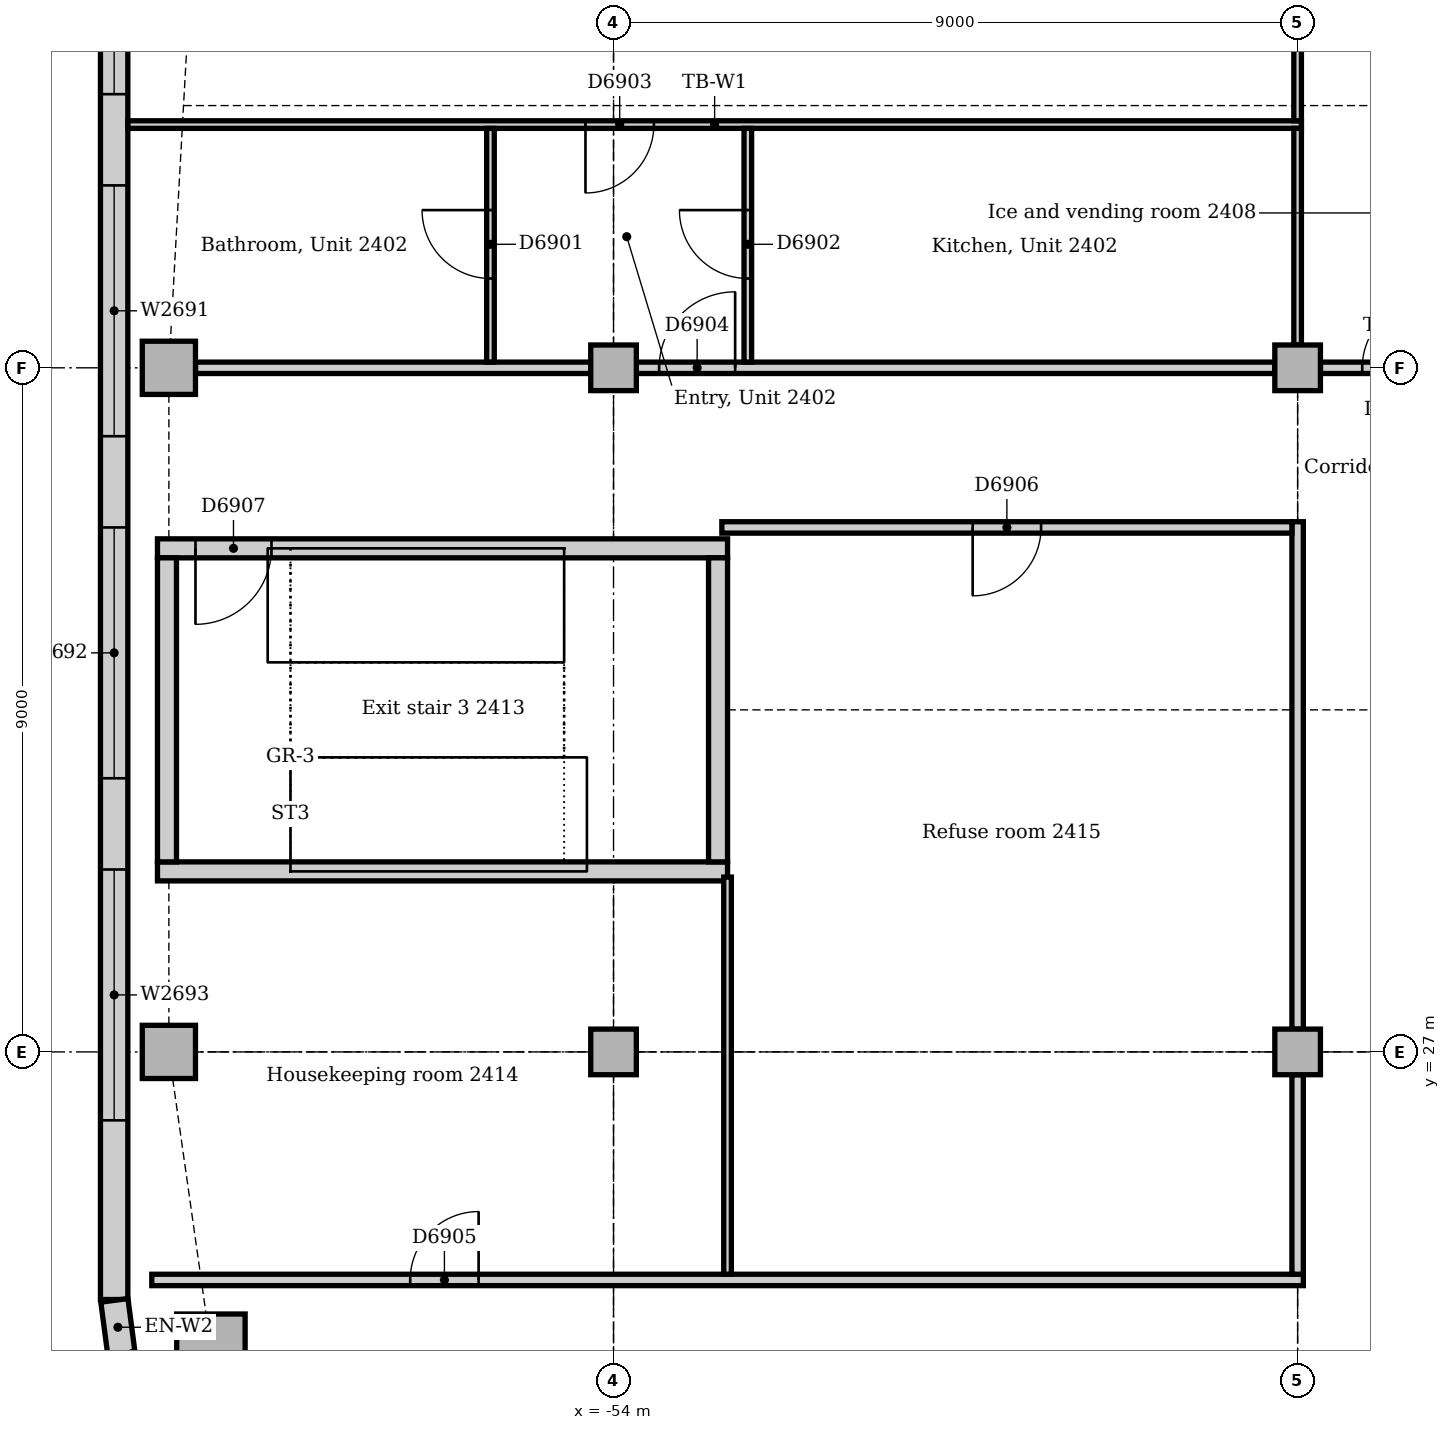
"""IFC4 building model, lengths in metres.
Left out: names, types, materials, properties, quantities, classifications, styles, units other than length and angle.
Written with IfcOpenShell. Run it as: python <this file> out.ifc"""

import sys

from ifc_helpers import new_model, si_unit, direction, frame, frame_2d, origin, origin_2d, place, context, subcontext, project, spatial, rectangle, extrude, element, fill, save


model = new_model("IFC4")
c1 = context("Model", 3, precision=1e-05, world=origin(), true_north=direction((0.0, 1.0)))
c2 = subcontext(c1, "Body", "Model", "MODEL_VIEW")
j1 = project(units=[si_unit("LENGTHUNIT", "METRE"), si_unit("PLANEANGLEUNIT", "RADIAN")], contexts=[c1])
p1 = place(None, origin())
s1 = spatial("IfcSite", under=j1, at=p1, CompositionType="ELEMENT")
p2 = place(p1, origin())
s2 = spatial("IfcBuilding", under=s1, at=p2, CompositionType="ELEMENT")
p3 = place(p2, frame((0.0, 0.0, 104.0)))
s3 = spatial("IfcBuildingStorey", under=s2, at=p3, CompositionType="ELEMENT", Elevation=104.0)
p4 = place(p3, frame((-60.0, 29.375, 0.0), z_axis=(0.0, 0.0, 1.0), x_axis=(1.0, 0.0, 0.0)))
e1 = element("IfcWall", 1, at=p4, inside=s3, PredefinedType="SOLIDWALL", context=c2, shape_type="SweptSolid", body=[
    extrude(rectangle(XDim=7.5, YDim=0.25, at=frame_2d((3.75, 0.0))), origin(), (0.0, 0.0, 1.0), 4.0),
])
p5 = place(p3, frame((-52.5, 33.625, 0.0), z_axis=(0.0, 0.0, 1.0), x_axis=(-1.0, 0.0, 0.0)))
e2 = element("IfcWall", 2, at=p5, inside=s3, PredefinedType="SOLIDWALL", context=c2, shape_type="SweptSolid", body=[
    extrude(rectangle(XDim=7.5, YDim=0.25, at=frame_2d((3.75, 0.0))), origin(), (0.0, 0.0, 1.0), 4.0),
])
p6 = place(p5, frame((6.0, 0.0, 0.0)))
e3 = element("IfcOpeningElement", 3, at=p6, cuts=e2, PredefinedType="OPENING", context=c2, shape_type="SweptSolid", body=[
    extrude(rectangle(XDim=1.0, YDim=2.1, at=frame_2d((0.5, 1.05))), frame((0.0, 0.135, 0.0), z_axis=(0.0, -1.0, 0.0), x_axis=(1.0, 0.0, 0.0)), (0.0, 0.0, 1.0), 0.27),
])
for number, where, z_axis, x_axis in (
    (4, (-52.625, 29.5, 0.0), (0.0, 0.0, 1.0), (0.0, 1.0, 0.0)),
    (5, (-59.875, 33.5, 0.0), (0.0, 0.0, 1.0), (0.0, -1.0, 0.0)),
):
    element("IfcWall", number, at=place(p3, frame(where, z_axis=z_axis, x_axis=x_axis)), inside=s3, PredefinedType="SOLIDWALL", context=c2, shape_type="SweptSolid", body=[
        extrude(rectangle(XDim=4.0, YDim=0.25, at=frame_2d((2.0, 0.0))), origin(), (0.0, 0.0, 1.0), 4.0),
    ])
p7 = place(p3, frame((-59.297, 23.102, 0.0), z_axis=(0.0, 0.0, 1.0), x_axis=(1.0, 0.0, 0.0)))
e6 = element("IfcColumn", 6, at=p7, inside=s3, PredefinedType="COLUMN", context=c2, shape_type="SweptSolid", body=[
    extrude(rectangle(XDim=0.9, YDim=0.9, at=origin_2d()), origin(), (0.0, 0.0, 1.0), 3.85),
])
for number, where, z_axis, x_axis in (
    (7, (-59.85, 27.0, 0.0), (0.0, 0.0, 1.0), (1.0, 0.0, 0.0)),
    (8, (-59.85, 36.0, 0.0), (0.0, 0.0, 1.0), (1.0, 0.0, 0.0)),
):
    element("IfcColumn", number, at=place(p3, frame(where, z_axis=z_axis, x_axis=x_axis)), inside=s3, PredefinedType="COLUMN", context=c2, shape_type="SweptSolid", body=[
        extrude(rectangle(XDim=0.7, YDim=0.7, at=origin_2d()), origin(), (0.0, 0.0, 1.0), 3.85),
    ])
for number, where, z_axis, x_axis in (
    (9, (-54.0, 27.0, 0.0), (0.0, 0.0, 1.0), (1.0, 0.0, 0.0)),
    (10, (-54.0, 36.0, 0.0), (0.0, 0.0, 1.0), (1.0, 0.0, 0.0)),
    (11, (-45.0, 27.0, 0.0), (0.0, 0.0, 1.0), (1.0, 0.0, 0.0)),
    (12, (-45.0, 36.0, 0.0), (0.0, 0.0, 1.0), (1.0, 0.0, 0.0)),
):
    element("IfcColumn", number, at=place(p3, frame(where, z_axis=z_axis, x_axis=x_axis)), inside=s3, PredefinedType="COLUMN", context=c2, shape_type="SweptSolid", body=[
        extrude(rectangle(XDim=0.6, YDim=0.6, at=origin_2d()), origin(), (0.0, 0.0, 1.0), 3.85),
    ])
p8 = place(p3, frame((-60.57, 45.257, 0.0), z_axis=(0.0, 0.0, 1.0), x_axis=(0.0, -1.0, 0.0)))
e13 = element("IfcWall", 13, at=p8, inside=s3, PredefinedType="STANDARD", context=c2, shape_type="SweptSolid", body=[
    extrude(rectangle(XDim=21.515, YDim=0.36, at=frame_2d((10.757, 0.0))), origin(), (0.0, 0.0, 1.0), 3.85),
])
p9 = place(p8, frame((2.357, 0.0, 0.9)))
e14 = element("IfcOpeningElement", 14, at=p9, cuts=e13, PredefinedType="OPENING", context=c2, shape_type="SweptSolid", body=[
    extrude(rectangle(XDim=3.3, YDim=1.6, at=frame_2d((1.65, 0.8))), frame((0.0, 0.19, 0.0), z_axis=(0.0, -1.0, 0.0), x_axis=(1.0, 0.0, 0.0)), (0.0, 0.0, 1.0), 0.38),
])
p10 = place(p8, frame((6.857, 0.0, 0.9)))
e15 = element("IfcOpeningElement", 15, at=p10, cuts=e13, PredefinedType="OPENING", context=c2, shape_type="SweptSolid", body=[
    extrude(rectangle(XDim=3.3, YDim=1.6, at=frame_2d((1.65, 0.8))), frame((0.0, 0.19, 0.0), z_axis=(0.0, -1.0, 0.0), x_axis=(1.0, 0.0, 0.0)), (0.0, 0.0, 1.0), 0.38),
])
p11 = place(p8, frame((11.357, 0.0, 0.9)))
e16 = element("IfcOpeningElement", 16, at=p11, cuts=e13, PredefinedType="OPENING", context=c2, shape_type="SweptSolid", body=[
    extrude(rectangle(XDim=3.3, YDim=1.6, at=frame_2d((1.65, 0.8))), frame((0.0, 0.19, 0.0), z_axis=(0.0, -1.0, 0.0), x_axis=(1.0, 0.0, 0.0)), (0.0, 0.0, 1.0), 0.38),
])
p12 = place(p8, frame((15.857, 0.0, 0.9)))
e17 = element("IfcOpeningElement", 17, at=p12, cuts=e13, PredefinedType="OPENING", context=c2, shape_type="SweptSolid", body=[
    extrude(rectangle(XDim=3.3, YDim=1.6, at=frame_2d((1.65, 0.8))), frame((0.0, 0.19, 0.0), z_axis=(0.0, -1.0, 0.0), x_axis=(1.0, 0.0, 0.0)), (0.0, 0.0, 1.0), 0.38),
])
p13 = place(p3, frame((-60.567, 23.731, 0.0), z_axis=(0.0, 0.0, 1.0), x_axis=(0.13055608231, -0.99144092581, 0.0)))
e18 = element("IfcWall", 18, at=p13, inside=s3, PredefinedType="STANDARD", context=c2, shape_type="SweptSolid", body=[
    extrude(rectangle(XDim=0.713, YDim=0.36, at=frame_2d((0.356, 0.0))), origin(), (0.0, 0.0, 1.0), 3.85),
])
p14 = place(p3, frame((-44.7, 36.0, 0.0), z_axis=(0.0, 0.0, 1.0), x_axis=(1.0, 0.0, 0.0)))
e19 = element("IfcWall", 19, at=p14, inside=s3, PredefinedType="PARTITIONING", context=c2, shape_type="SweptSolid", body=[
    extrude(rectangle(XDim=1.975, YDim=0.15, at=frame_2d((0.988, 0.0))), origin(), (0.0, 0.0, 1.0), 3.602),
])
p15 = place(p14, frame((0.55, 0.0, 0.0)))
e20 = element("IfcOpeningElement", 20, at=p15, cuts=e19, PredefinedType="OPENING", context=c2, shape_type="SweptSolid", body=[
    extrude(rectangle(XDim=0.9, YDim=2.1, at=frame_2d((0.45, 1.05))), frame((0.0, 0.085, 0.0), z_axis=(0.0, -1.0, 0.0), x_axis=(1.0, 0.0, 0.0)), (0.0, 0.0, 1.0), 0.17),
])
p16 = place(p3, frame((-53.7, 36.0, 0.0), z_axis=(0.0, 0.0, 1.0), x_axis=(1.0, 0.0, 0.0)))
e21 = element("IfcWall", 21, at=p16, inside=s3, PredefinedType="PARTITIONING", context=c2, shape_type="SweptSolid", body=[
    extrude(rectangle(XDim=8.4, YDim=0.15, at=frame_2d((4.2, 0.0))), origin(), (0.0, 0.0, 1.0), 3.262),
])
p17 = place(p16, frame((0.3, 0.0, 0.0)))
e22 = element("IfcOpeningElement", 22, at=p17, cuts=e21, PredefinedType="OPENING", context=c2, shape_type="SweptSolid", body=[
    extrude(rectangle(XDim=1.0, YDim=2.1, at=frame_2d((0.5, 1.05))), frame((0.0, 0.085, 0.0), z_axis=(0.0, -1.0, 0.0), x_axis=(1.0, 0.0, 0.0)), (0.0, 0.0, 1.0), 0.17),
])
p18 = place(p3, frame((-59.5, 36.0, 0.0), z_axis=(0.0, 0.0, 1.0), x_axis=(1.0, 0.0, 0.0)))
e23 = element("IfcWall", 23, at=p18, inside=s3, PredefinedType="PARTITIONING", context=c2, shape_type="SweptSolid", body=[
    extrude(rectangle(XDim=5.2, YDim=0.15, at=frame_2d((2.6, 0.0))), origin(), (0.0, 0.0, 1.0), 3.35),
])
p19 = place(p3, frame((-60.075, 24.0, 0.0), z_axis=(0.0, 0.0, 1.0), x_axis=(1.0, 0.0, 0.0)))
e24 = element("IfcWall", 24, at=p19, inside=s3, PredefinedType="PARTITIONING", context=c2, shape_type="SweptSolid", body=[
    extrude(rectangle(XDim=15.15, YDim=0.15, at=frame_2d((7.575, 0.0))), origin(), (0.0, 0.0, 1.0), 3.85),
])
p20 = place(p19, frame((3.4, 0.0, 0.0)))
e25 = element("IfcOpeningElement", 25, at=p20, cuts=e24, PredefinedType="OPENING", context=c2, shape_type="SweptSolid", body=[
    extrude(rectangle(XDim=0.9, YDim=2.1, at=frame_2d((0.45, 1.05))), frame((0.0, 0.085, 0.0), z_axis=(0.0, -1.0, 0.0), x_axis=(1.0, 0.0, 0.0)), (0.0, 0.0, 1.0), 0.17),
])
p21 = place(p3, frame((-45.0, 24.075, 0.0), z_axis=(0.0, 0.0, 1.0), x_axis=(0.0, 1.0, 0.0)))
e26 = element("IfcWall", 26, at=p21, inside=s3, PredefinedType="PARTITIONING", context=c2, shape_type="SweptSolid", body=[
    extrude(rectangle(XDim=2.625, YDim=0.15, at=frame_2d((1.312, 0.0))), origin(), (0.0, 0.0, 1.0), 3.362),
])
p22 = place(p3, frame((-45.0, 27.3, 0.0), z_axis=(0.0, 0.0, 1.0), x_axis=(0.0, 1.0, 0.0)))
e27 = element("IfcWall", 27, at=p22, inside=s3, PredefinedType="PARTITIONING", context=c2, shape_type="SweptSolid", body=[
    extrude(rectangle(XDim=6.675, YDim=0.15, at=frame_2d((3.337, 0.0))), origin(), (0.0, 0.0, 1.0), 3.362),
])
p23 = place(p3, frame((-52.575, 33.9, 0.0), z_axis=(0.0, 0.0, 1.0), x_axis=(1.0, 0.0, 0.0)))
e28 = element("IfcWall", 28, at=p23, inside=s3, PredefinedType="PARTITIONING", context=c2, shape_type="SweptSolid", body=[
    extrude(rectangle(XDim=7.5, YDim=0.15, at=frame_2d((3.75, 0.0))), origin(), (0.0, 0.0, 1.0), 3.85),
])
p24 = place(p23, frame((3.3, 0.0, 0.0)))
e29 = element("IfcOpeningElement", 29, at=p24, cuts=e28, PredefinedType="OPENING", context=c2, shape_type="SweptSolid", body=[
    extrude(rectangle(XDim=0.9, YDim=2.1, at=frame_2d((0.45, 1.05))), frame((0.0, 0.085, 0.0), z_axis=(0.0, -1.0, 0.0), x_axis=(1.0, 0.0, 0.0)), (0.0, 0.0, 1.0), 0.17),
])
p25 = place(p3, frame((-60.39, 39.2, 0.0), z_axis=(0.0, 0.0, 1.0), x_axis=(1.0, 0.0, 0.0)))
e30 = element("IfcWall", 30, at=p25, inside=s3, PredefinedType="PARTITIONING", context=c2, shape_type="SweptSolid", body=[
    extrude(rectangle(XDim=15.44, YDim=0.1, at=frame_2d((7.72, 0.0))), origin(), (0.0, 0.0, 1.0), 3.85),
])
p26 = place(p25, frame((6.021, 0.0, 0.0)))
e31 = element("IfcOpeningElement", 31, at=p26, cuts=e30, PredefinedType="OPENING", context=c2, shape_type="SweptSolid", body=[
    extrude(rectangle(XDim=0.9, YDim=2.1, at=frame_2d((0.45, 1.05))), frame((0.0, 0.06, 0.0), z_axis=(0.0, -1.0, 0.0), x_axis=(1.0, 0.0, 0.0)), (0.0, 0.0, 1.0), 0.12),
])
p27 = place(p3, frame((-45.0, 39.25, 0.0), z_axis=(0.0, 0.0, 1.0), x_axis=(0.0, 1.0, 0.0)))
e32 = element("IfcWall", 32, at=p27, inside=s3, PredefinedType="PARTITIONING", context=c2, shape_type="SweptSolid", body=[
    extrude(rectangle(XDim=6.8, YDim=0.1, at=frame_2d((3.4, 0.0))), origin(), (0.0, 0.0, 1.0), 3.362),
])
p28 = place(p3, frame((-45.0, 36.3, 0.0), z_axis=(0.0, 0.0, 1.0), x_axis=(0.0, 1.0, 0.0)))
e33 = element("IfcWall", 33, at=p28, inside=s3, PredefinedType="PARTITIONING", context=c2, shape_type="SweptSolid", body=[
    extrude(rectangle(XDim=2.85, YDim=0.1, at=frame_2d((1.425, 0.0))), origin(), (0.0, 0.0, 1.0), 3.362),
])
p29 = place(p3, frame((-52.5, 24.075, 0.0), z_axis=(0.0, 0.0, 1.0), x_axis=(0.0, 1.0, 0.0)))
e34 = element("IfcWall", 34, at=p29, inside=s3, PredefinedType="PARTITIONING", context=c2, shape_type="SweptSolid", body=[
    extrude(rectangle(XDim=5.225, YDim=0.1, at=frame_2d((2.612, 0.0))), origin(), (0.0, 0.0, 1.0), 3.85),
])
p30 = place(p3, frame((-55.619, 36.075, 0.0), z_axis=(0.0, 0.0, 1.0), x_axis=(0.0, 1.0, 0.0)))
e35 = element("IfcWall", 35, at=p30, inside=s3, PredefinedType="PARTITIONING", context=c2, shape_type="SweptSolid", body=[
    extrude(rectangle(XDim=3.075, YDim=0.1, at=frame_2d((1.538, 0.0))), origin(), (0.0, 0.0, 1.0), 3.85),
])
p31 = place(p30, frame((1.1, 0.0, 0.0)))
e36 = element("IfcOpeningElement", 36, at=p31, cuts=e35, PredefinedType="OPENING", context=c2, shape_type="SweptSolid", body=[
    extrude(rectangle(XDim=0.9, YDim=2.1, at=frame_2d((0.45, 1.05))), frame((0.0, 0.06, 0.0), z_axis=(0.0, -1.0, 0.0), x_axis=(1.0, 0.0, 0.0)), (0.0, 0.0, 1.0), 0.12),
])
p32 = place(p3, frame((-52.233, 36.075, 0.0), z_axis=(0.0, 0.0, 1.0), x_axis=(0.0, 1.0, 0.0)))
e37 = element("IfcWall", 37, at=p32, inside=s3, PredefinedType="PARTITIONING", context=c2, shape_type="SweptSolid", body=[
    extrude(rectangle(XDim=3.075, YDim=0.1, at=frame_2d((1.538, 0.0))), origin(), (0.0, 0.0, 1.0), 3.85),
])
p33 = place(p32, frame((1.1, 0.0, 0.0)))
e38 = element("IfcOpeningElement", 38, at=p33, cuts=e37, PredefinedType="OPENING", context=c2, shape_type="SweptSolid", body=[
    extrude(rectangle(XDim=0.9, YDim=2.1, at=frame_2d((0.45, 1.05))), frame((0.0, 0.06, 0.0), z_axis=(0.0, -1.0, 0.0), x_axis=(1.0, 0.0, 0.0)), (0.0, 0.0, 1.0), 0.12),
])
p34 = place(p9, origin())
e39 = element("IfcWindow", 39, at=p34, inside=s3, PartitioningType="SINGLE_PANEL", PredefinedType="WINDOW", context=c2, shape_type="SweptSolid", body=[
    extrude(rectangle(XDim=3.3, YDim=1.6, at=frame_2d((1.65, 0.8))), frame((0.0, 0.13, 0.0), z_axis=(0.0, -1.0, 0.0), x_axis=(1.0, 0.0, 0.0)), (0.0, 0.0, 1.0), 0.06),
])
fill(e14, e39)
p35 = place(p10, origin())
e40 = element("IfcWindow", 40, at=p35, inside=s3, PartitioningType="SINGLE_PANEL", PredefinedType="WINDOW", context=c2, shape_type="SweptSolid", body=[
    extrude(rectangle(XDim=3.3, YDim=1.6, at=frame_2d((1.65, 0.8))), frame((0.0, 0.13, 0.0), z_axis=(0.0, -1.0, 0.0), x_axis=(1.0, 0.0, 0.0)), (0.0, 0.0, 1.0), 0.06),
])
fill(e15, e40)
p36 = place(p11, origin())
e41 = element("IfcWindow", 41, at=p36, inside=s3, PartitioningType="SINGLE_PANEL", PredefinedType="WINDOW", context=c2, shape_type="SweptSolid", body=[
    extrude(rectangle(XDim=3.3, YDim=1.6, at=frame_2d((1.65, 0.8))), frame((0.0, 0.13, 0.0), z_axis=(0.0, -1.0, 0.0), x_axis=(1.0, 0.0, 0.0)), (0.0, 0.0, 1.0), 0.06),
])
fill(e16, e41)
p37 = place(p12, origin())
e42 = element("IfcWindow", 42, at=p37, inside=s3, PartitioningType="SINGLE_PANEL", PredefinedType="WINDOW", context=c2, shape_type="SweptSolid", body=[
    extrude(rectangle(XDim=3.3, YDim=1.6, at=frame_2d((1.65, 0.8))), frame((0.0, 0.13, 0.0), z_axis=(0.0, -1.0, 0.0), x_axis=(1.0, 0.0, 0.0)), (0.0, 0.0, 1.0), 0.06),
])
fill(e17, e42)
p38 = place(p15, origin())
e43 = element("IfcDoor", 43, at=p38, inside=s3, OperationType="SINGLE_SWING_RIGHT", PredefinedType="DOOR", context=c2, shape_type="SweptSolid", body=[
    extrude(rectangle(XDim=0.9, YDim=2.1, at=frame_2d((0.45, 1.05))), frame((0.0, 0.025, 0.0), z_axis=(0.0, -1.0, 0.0), x_axis=(1.0, 0.0, 0.0)), (0.0, 0.0, 1.0), 0.05),
])
fill(e20, e43)
p39 = place(p31, origin())
e44 = element("IfcDoor", 44, at=p39, inside=s3, OperationType="SINGLE_SWING_RIGHT", PredefinedType="DOOR", context=c2, shape_type="SweptSolid", body=[
    extrude(rectangle(XDim=0.9, YDim=2.1, at=frame_2d((0.45, 1.05))), frame((0.0, 0.025, 0.0), z_axis=(0.0, -1.0, 0.0), x_axis=(1.0, 0.0, 0.0)), (0.0, 0.0, 1.0), 0.05),
])
fill(e36, e44)
p40 = place(p33, origin())
e45 = element("IfcDoor", 45, at=p40, inside=s3, OperationType="SINGLE_SWING_RIGHT", PredefinedType="DOOR", context=c2, shape_type="SweptSolid", body=[
    extrude(rectangle(XDim=0.9, YDim=2.1, at=frame_2d((0.45, 1.05))), frame((0.0, 0.025, 0.0), z_axis=(0.0, -1.0, 0.0), x_axis=(1.0, 0.0, 0.0)), (0.0, 0.0, 1.0), 0.05),
])
fill(e38, e45)
p41 = place(p26, frame((0.9, 0.0, 0.0), z_axis=(0.0, 0.0, 1.0), x_axis=(-1.0, 0.0, 0.0)))
e46 = element("IfcDoor", 46, at=p41, inside=s3, OperationType="SINGLE_SWING_RIGHT", PredefinedType="DOOR", context=c2, shape_type="SweptSolid", body=[
    extrude(rectangle(XDim=0.9, YDim=2.1, at=frame_2d((0.45, 1.05))), frame((0.0, 0.025, 0.0), z_axis=(0.0, -1.0, 0.0), x_axis=(1.0, 0.0, 0.0)), (0.0, 0.0, 1.0), 0.05),
])
fill(e31, e46)
p42 = place(p17, origin())
e47 = element("IfcDoor", 47, at=p42, inside=s3, OperationType="SINGLE_SWING_RIGHT", PredefinedType="DOOR", context=c2, shape_type="SweptSolid", body=[
    extrude(rectangle(XDim=1.0, YDim=2.1, at=frame_2d((0.5, 1.05))), frame((0.0, 0.025, 0.0), z_axis=(0.0, -1.0, 0.0), x_axis=(1.0, 0.0, 0.0)), (0.0, 0.0, 1.0), 0.05),
])
fill(e22, e47)
p43 = place(p20, origin())
e48 = element("IfcDoor", 48, at=p43, inside=s3, OperationType="SINGLE_SWING_RIGHT", PredefinedType="DOOR", context=c2, shape_type="SweptSolid", body=[
    extrude(rectangle(XDim=0.9, YDim=2.1, at=frame_2d((0.45, 1.05))), frame((0.0, 0.025, 0.0), z_axis=(0.0, -1.0, 0.0), x_axis=(1.0, 0.0, 0.0)), (0.0, 0.0, 1.0), 0.05),
])
fill(e25, e48)
p44 = place(p24, frame((0.9, 0.0, 0.0), z_axis=(0.0, 0.0, 1.0), x_axis=(-1.0, 0.0, 0.0)))
e49 = element("IfcDoor", 49, at=p44, inside=s3, OperationType="SINGLE_SWING_RIGHT", PredefinedType="DOOR", context=c2, shape_type="SweptSolid", body=[
    extrude(rectangle(XDim=0.9, YDim=2.1, at=frame_2d((0.45, 1.05))), frame((0.0, 0.025, 0.0), z_axis=(0.0, -1.0, 0.0), x_axis=(1.0, 0.0, 0.0)), (0.0, 0.0, 1.0), 0.05),
])
fill(e29, e49)
p45 = place(p6, origin())
e50 = element("IfcDoor", 50, at=p45, inside=s3, OperationType="SINGLE_SWING_RIGHT", PredefinedType="DOOR", context=c2, shape_type="SweptSolid", body=[
    extrude(rectangle(XDim=1.0, YDim=2.1, at=frame_2d((0.5, 1.05))), frame((0.0, 0.025, 0.0), z_axis=(0.0, -1.0, 0.0), x_axis=(1.0, 0.0, 0.0)), (0.0, 0.0, 1.0), 0.05),
])
fill(e3, e50)
save(model, sys.argv[1])
